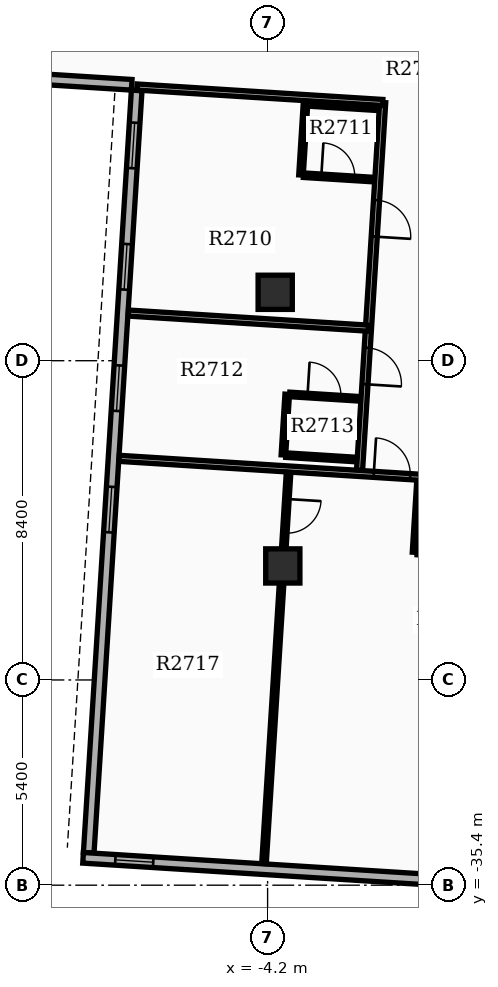
"""IFC4 building model, lengths in metres.
Left out: names, types, materials, properties, quantities, classifications, styles, units other than length and angle.
Written with IfcOpenShell. Run it as: python <this file> out.ifc"""

import sys

from ifc_helpers import new_model, si_unit, direction, frame, frame_2d, origin, origin_2d, place, context, subcontext, project, spatial, rectangle, extrude, element, fill, save


model = new_model("IFC4")
c1 = context("Model", 3, precision=1e-05, world=origin(), true_north=direction((0.0, 1.0)))
c2 = subcontext(c1, "Body", "Model", "MODEL_VIEW")
j1 = project(units=[si_unit("LENGTHUNIT", "METRE"), si_unit("PLANEANGLEUNIT", "RADIAN")], contexts=[c1])
p1 = place(None, origin())
s1 = spatial("IfcSite", under=j1, at=p1, CompositionType="ELEMENT")
p2 = place(p1, origin())
s2 = spatial("IfcBuilding", under=s1, at=p2, CompositionType="ELEMENT")
p3 = place(p2, frame((0.0, 0.0, 168.3)))
s3 = spatial("IfcBuildingStorey", under=s2, at=p3, CompositionType="ELEMENT", Elevation=168.3)
for number, where, z_axis, x_axis in (
    (1, (-4.0, -19.8, 0.0), (0.0, 0.0, 1.0), (1.0, 0.0, 0.0)),
    (2, (-3.8, -27.0, 0.0), (0.0, 0.0, 1.0), (1.0, 0.0, 0.0)),
):
    element("IfcColumn", number, at=place(p3, frame(where, z_axis=z_axis, x_axis=x_axis)), inside=s3, PredefinedType="COLUMN", context=c2, shape_type="SweptSolid", body=[
        extrude(rectangle(XDim=0.9, YDim=0.9, at=origin_2d()), origin(), (0.0, 0.0, 1.0), 3.9),
    ])
p4 = place(p3, frame((-7.645, -14.489, 0.0), z_axis=(0.0, 0.0, 1.0), x_axis=(-0.06279645424, -0.99802635503, 0.0)))
e3 = element("IfcWall", 3, at=p4, inside=s3, PredefinedType="STANDARD", context=c2, shape_type="SweptSolid", body=[
    extrude(rectangle(XDim=20.1, YDim=0.28, at=frame_2d((10.05, 0.0))), origin(), (0.0, 0.0, 1.0), 2.97),
])
p5 = place(p4, frame((0.85, 0.0, 0.8)))
e4 = element("IfcOpeningElement", 4, at=p5, cuts=e3, PredefinedType="OPENING", context=c2, shape_type="SweptSolid", body=[
    extrude(rectangle(XDim=1.2, YDim=1.6, at=frame_2d((0.6, 0.8))), frame((0.0, 0.15, 0.0), z_axis=(0.0, -1.0, 0.0), x_axis=(1.0, 0.0, 0.0)), (0.0, 0.0, 1.0), 0.3),
])
p6 = place(p4, frame((4.05, 0.0, 0.8)))
e5 = element("IfcOpeningElement", 5, at=p6, cuts=e3, PredefinedType="OPENING", context=c2, shape_type="SweptSolid", body=[
    extrude(rectangle(XDim=1.2, YDim=1.6, at=frame_2d((0.6, 0.8))), frame((0.0, 0.15, 0.0), z_axis=(0.0, -1.0, 0.0), x_axis=(1.0, 0.0, 0.0)), (0.0, 0.0, 1.0), 0.3),
])
p7 = place(p4, frame((7.25, 0.0, 0.8)))
e6 = element("IfcOpeningElement", 6, at=p7, cuts=e3, PredefinedType="OPENING", context=c2, shape_type="SweptSolid", body=[
    extrude(rectangle(XDim=1.2, YDim=1.6, at=frame_2d((0.6, 0.8))), frame((0.0, 0.15, 0.0), z_axis=(0.0, -1.0, 0.0), x_axis=(1.0, 0.0, 0.0)), (0.0, 0.0, 1.0), 0.3),
])
p8 = place(p4, frame((10.45, 0.0, 0.8)))
e7 = element("IfcOpeningElement", 7, at=p8, cuts=e3, PredefinedType="OPENING", context=c2, shape_type="SweptSolid", body=[
    extrude(rectangle(XDim=1.2, YDim=1.6, at=frame_2d((0.6, 0.8))), frame((0.0, 0.15, 0.0), z_axis=(0.0, -1.0, 0.0), x_axis=(1.0, 0.0, 0.0)), (0.0, 0.0, 1.0), 0.3),
])
p9 = place(p3, frame((-9.055, -34.68, 0.0), z_axis=(0.0, 0.0, 1.0), x_axis=(0.998026318072, -0.062797041623, 0.0)))
e8 = element("IfcWall", 8, at=p9, inside=s3, PredefinedType="STANDARD", context=c2, shape_type="SweptSolid", body=[
    extrude(rectangle(XDim=13.72, YDim=0.28, at=frame_2d((6.86, 0.0))), origin(), (0.0, 0.0, 1.0), 2.97),
])
p10 = place(p9, frame((0.85, 0.0, 0.85)))
e9 = element("IfcOpeningElement", 9, at=p10, cuts=e8, PredefinedType="OPENING", context=c2, shape_type="SweptSolid", body=[
    extrude(rectangle(XDim=1.0, YDim=1.5, at=frame_2d((0.5, 0.75))), frame((0.0, 0.15, 0.0), z_axis=(0.0, -1.0, 0.0), x_axis=(1.0, 0.0, 0.0)), (0.0, 0.0, 1.0), 0.3),
])
p11 = place(p3, frame((-14.063, -13.945, 0.0), z_axis=(0.0, 0.0, 1.0), x_axis=(0.998027314704, -0.062781200242, 0.0)))
e10 = element("IfcWall", 10, at=p11, inside=s3, PredefinedType="STANDARD", context=c2, shape_type="SweptSolid", body=[
    extrude(rectangle(XDim=6.3, YDim=0.28, at=frame_2d((3.15, 0.0))), origin(), (0.0, 0.0, 1.0), 2.97),
])
p12 = place(p3, frame((-1.172, -14.806, 0.0), z_axis=(0.0, 0.0, 1.0), x_axis=(-0.062771584278, -0.998027919553, 0.0)))
e11 = element("IfcWall", 11, at=p12, inside=s3, PredefinedType="PARTITIONING", context=c2, shape_type="SweptSolid", body=[
    extrude(rectangle(XDim=9.7, YDim=0.16, at=frame_2d((4.85, 0.0))), origin(), (0.0, 0.0, 1.0), 2.96),
])
p13 = place(p12, frame((2.575, 0.0, 0.0)))
e12 = element("IfcOpeningElement", 12, at=p13, cuts=e11, PredefinedType="OPENING", context=c2, shape_type="SweptSolid", body=[
    extrude(rectangle(XDim=0.96, YDim=2.15, at=frame_2d((0.48, 1.075))), frame((0.0, 0.09, 0.0), z_axis=(0.0, -1.0, 0.0), x_axis=(1.0, 0.0, 0.0)), (0.0, 0.0, 1.0), 0.18),
])
p14 = place(p12, frame((6.467, 0.0, 0.0)))
e13 = element("IfcOpeningElement", 13, at=p14, cuts=e11, PredefinedType="OPENING", context=c2, shape_type="SweptSolid", body=[
    extrude(rectangle(XDim=0.96, YDim=2.15, at=frame_2d((0.48, 1.075))), frame((0.0, 0.09, 0.0), z_axis=(0.0, -1.0, 0.0), x_axis=(1.0, 0.0, 0.0)), (0.0, 0.0, 1.0), 0.18),
])
p15 = place(p3, frame((-1.172, -14.806, 0.0), z_axis=(0.0, 0.0, 1.0), x_axis=(-0.998025657815, 0.06280753413, 0.0)))
e14 = element("IfcWall", 14, at=p15, inside=s3, PredefinedType="PARTITIONING", context=c2, shape_type="SweptSolid", body=[
    extrude(rectangle(XDim=6.48, YDim=0.16, at=frame_2d((3.24, 0.0))), origin(), (0.0, 0.0, 1.0), 2.96),
])
p16 = place(p3, frame((-1.546, -20.744, 0.0), z_axis=(0.0, 0.0, 1.0), x_axis=(-0.998025479614, 0.06281036572, 0.0)))
e15 = element("IfcWall", 15, at=p16, inside=s3, PredefinedType="PARTITIONING", context=c2, shape_type="SweptSolid", body=[
    extrude(rectangle(XDim=6.332, YDim=0.16, at=frame_2d((3.166, 0.0))), origin(), (0.0, 0.0, 1.0), 2.96),
])
p17 = place(p3, frame((-3.256, -16.719, 0.0), z_axis=(0.0, 0.0, 1.0), x_axis=(0.998027443946, -0.062779145668, 0.0)))
e16 = element("IfcWall", 16, at=p17, inside=s3, PredefinedType="PARTITIONING", context=c2, shape_type="SweptSolid", body=[
    extrude(rectangle(XDim=1.82, YDim=0.12, at=frame_2d((0.91, 0.0))), origin(), (0.0, 0.0, 1.0), 2.96),
])
p18 = place(p17, frame((0.47, 0.0, 0.0)))
e17 = element("IfcOpeningElement", 17, at=p18, cuts=e16, PredefinedType="OPENING", context=c2, shape_type="SweptSolid", body=[
    extrude(rectangle(XDim=0.88, YDim=2.1, at=frame_2d((0.44, 1.05))), frame((0.0, 0.07, 0.0), z_axis=(0.0, -1.0, 0.0), x_axis=(1.0, 0.0, 0.0)), (0.0, 0.0, 1.0), 0.14),
])
p19 = place(p3, frame((-3.138, -14.842, 0.0), z_axis=(0.0, 0.0, 1.0), x_axis=(0.998027443946, -0.062779145668, 0.0)))
e18 = element("IfcWall", 18, at=p19, inside=s3, PredefinedType="PARTITIONING", context=c2, shape_type="SweptSolid", body=[
    extrude(rectangle(XDim=1.82, YDim=0.12, at=frame_2d((0.91, 0.0))), origin(), (0.0, 0.0, 1.0), 2.96),
])
p20 = place(p3, frame((-3.203, -14.838, 0.0), z_axis=(0.0, 0.0, 1.0), x_axis=(-0.062847152131, -0.998023163794, 0.0)))
e19 = element("IfcWall", 19, at=p20, inside=s3, PredefinedType="PARTITIONING", context=c2, shape_type="SweptSolid", body=[
    extrude(rectangle(XDim=1.88, YDim=0.12, at=frame_2d((0.94, 0.0))), origin(), (0.0, 0.0, 1.0), 2.96),
])
p21 = place(p3, frame((-3.619, -22.487, 0.0), z_axis=(0.0, 0.0, 1.0), x_axis=(0.998027443946, -0.062779145668, 0.0)))
e20 = element("IfcWall", 20, at=p21, inside=s3, PredefinedType="PARTITIONING", context=c2, shape_type="SweptSolid", body=[
    extrude(rectangle(XDim=1.82, YDim=0.12, at=frame_2d((0.91, 0.0))), origin(), (0.0, 0.0, 1.0), 2.96),
])
p22 = place(p21, frame((0.47, 0.0, 0.0)))
e21 = element("IfcOpeningElement", 21, at=p22, cuts=e20, PredefinedType="OPENING", context=c2, shape_type="SweptSolid", body=[
    extrude(rectangle(XDim=0.88, YDim=2.1, at=frame_2d((0.44, 1.05))), frame((0.0, 0.07, 0.0), z_axis=(0.0, -1.0, 0.0), x_axis=(1.0, 0.0, 0.0)), (0.0, 0.0, 1.0), 0.14),
])
p23 = place(p3, frame((-3.719, -24.084, 0.0), z_axis=(0.0, 0.0, 1.0), x_axis=(0.998026915151, -0.062787551592, 0.0)))
e22 = element("IfcWall", 22, at=p23, inside=s3, PredefinedType="PARTITIONING", context=c2, shape_type="SweptSolid", body=[
    extrude(rectangle(XDim=1.82, YDim=0.12, at=frame_2d((0.91, 0.0))), origin(), (0.0, 0.0, 1.0), 2.96),
])
p24 = place(p3, frame((-3.684, -22.483, 0.0), z_axis=(0.0, 0.0, 1.0), x_axis=(-0.06271075472, -0.998031743605, 0.0)))
e23 = element("IfcWall", 23, at=p24, inside=s3, PredefinedType="PARTITIONING", context=c2, shape_type="SweptSolid", body=[
    extrude(rectangle(XDim=1.6, YDim=0.12, at=frame_2d((0.8, 0.0))), origin(), (0.0, 0.0, 1.0), 2.96),
])
p25 = place(p3, frame((-8.105, -24.169, 0.0), z_axis=(0.0, 0.0, 1.0), x_axis=(0.998026109115, -0.062800362452, 0.0)))
e24 = element("IfcWall", 24, at=p25, inside=s3, PredefinedType="PARTITIONING", context=c2, shape_type="SweptSolid", body=[
    extrude(rectangle(XDim=13.144, YDim=0.16, at=frame_2d((6.572, 0.0))), origin(), (0.0, 0.0, 1.0), 2.96),
])
p26 = place(p25, frame((6.712, 0.0, 0.0)))
e25 = element("IfcOpeningElement", 25, at=p26, cuts=e24, PredefinedType="OPENING", context=c2, shape_type="SweptSolid", body=[
    extrude(rectangle(XDim=0.96, YDim=2.15, at=frame_2d((0.48, 1.075))), frame((0.0, 0.09, 0.0), z_axis=(0.0, -1.0, 0.0), x_axis=(1.0, 0.0, 0.0)), (0.0, 0.0, 1.0), 0.18),
])
p27 = place(p3, frame((-3.648, -24.539, 0.0), z_axis=(0.0, 0.0, 1.0), x_axis=(-0.062786562543, -0.998026977373, 0.0)))
e26 = element("IfcWall", 26, at=p27, inside=s3, PredefinedType="PARTITIONING", context=c2, shape_type="SweptSolid", body=[
    extrude(rectangle(XDim=10.312, YDim=0.12, at=frame_2d((5.156, 0.0))), origin(), (0.0, 0.0, 1.0), 2.96),
])
p28 = place(p27, frame((0.7, 0.0, 0.0)))
e27 = element("IfcOpeningElement", 27, at=p28, cuts=e26, PredefinedType="OPENING", context=c2, shape_type="SweptSolid", body=[
    extrude(rectangle(XDim=0.9, YDim=2.1, at=frame_2d((0.45, 1.05))), frame((0.0, 0.07, 0.0), z_axis=(0.0, -1.0, 0.0), x_axis=(1.0, 0.0, 0.0)), (0.0, 0.0, 1.0), 0.14),
])
p29 = place(p3, frame((-0.219, -24.825, 0.0), z_axis=(0.0, 0.0, 1.0), x_axis=(-0.062779145668, -0.998027443946, 0.0)))
e28 = element("IfcWall", 28, at=p29, inside=s3, PredefinedType="PARTITIONING", context=c2, shape_type="SweptSolid", body=[
    extrude(rectangle(XDim=1.82, YDim=0.12, at=frame_2d((0.91, 0.0))), origin(), (0.0, 0.0, 1.0), 2.96),
])
p30 = place(p29, frame((0.45, 0.0, 0.0)))
e29 = element("IfcOpeningElement", 29, at=p30, cuts=e28, PredefinedType="OPENING", context=c2, shape_type="SweptSolid", body=[
    extrude(rectangle(XDim=0.88, YDim=2.1, at=frame_2d((0.44, 1.05))), frame((0.0, 0.07, 0.0), z_axis=(0.0, -1.0, 0.0), x_axis=(1.0, 0.0, 0.0)), (0.0, 0.0, 1.0), 0.14),
])
p31 = place(p3, frame((-0.264, -26.646, 0.0), z_axis=(0.0, 0.0, 1.0), x_axis=(0.998024591026, -0.062824483344, 0.0)))
e30 = element("IfcWall", 30, at=p31, inside=s3, PredefinedType="PARTITIONING", context=c2, shape_type="SweptSolid", body=[
    extrude(rectangle(XDim=2.18, YDim=0.12, at=frame_2d((1.09, 0.0))), origin(), (0.0, 0.0, 1.0), 2.96),
])
p32 = place(p5, origin())
e31 = element("IfcWindow", 31, at=p32, inside=s3, PartitioningType="SINGLE_PANEL", PredefinedType="WINDOW", context=c2, shape_type="SweptSolid", body=[
    extrude(rectangle(XDim=1.2, YDim=1.6, at=frame_2d((0.6, 0.8))), frame((0.0, 0.03, 0.0), z_axis=(0.0, -1.0, 0.0), x_axis=(1.0, 0.0, 0.0)), (0.0, 0.0, 1.0), 0.06),
])
fill(e4, e31)
p33 = place(p6, origin())
e32 = element("IfcWindow", 32, at=p33, inside=s3, PartitioningType="SINGLE_PANEL", PredefinedType="WINDOW", context=c2, shape_type="SweptSolid", body=[
    extrude(rectangle(XDim=1.2, YDim=1.6, at=frame_2d((0.6, 0.8))), frame((0.0, 0.03, 0.0), z_axis=(0.0, -1.0, 0.0), x_axis=(1.0, 0.0, 0.0)), (0.0, 0.0, 1.0), 0.06),
])
fill(e5, e32)
p34 = place(p7, origin())
e33 = element("IfcWindow", 33, at=p34, inside=s3, PartitioningType="SINGLE_PANEL", PredefinedType="WINDOW", context=c2, shape_type="SweptSolid", body=[
    extrude(rectangle(XDim=1.2, YDim=1.6, at=frame_2d((0.6, 0.8))), frame((0.0, 0.03, 0.0), z_axis=(0.0, -1.0, 0.0), x_axis=(1.0, 0.0, 0.0)), (0.0, 0.0, 1.0), 0.06),
])
fill(e6, e33)
p35 = place(p8, origin())
e34 = element("IfcWindow", 34, at=p35, inside=s3, PartitioningType="SINGLE_PANEL", PredefinedType="WINDOW", context=c2, shape_type="SweptSolid", body=[
    extrude(rectangle(XDim=1.2, YDim=1.6, at=frame_2d((0.6, 0.8))), frame((0.0, 0.03, 0.0), z_axis=(0.0, -1.0, 0.0), x_axis=(1.0, 0.0, 0.0)), (0.0, 0.0, 1.0), 0.06),
])
fill(e7, e34)
p36 = place(p10, origin())
e35 = element("IfcWindow", 35, at=p36, inside=s3, PartitioningType="SINGLE_PANEL", PredefinedType="WINDOW", context=c2, shape_type="SweptSolid", body=[
    extrude(rectangle(XDim=1.0, YDim=1.5, at=frame_2d((0.5, 0.75))), frame((0.0, 0.03, 0.0), z_axis=(0.0, -1.0, 0.0), x_axis=(1.0, 0.0, 0.0)), (0.0, 0.0, 1.0), 0.06),
])
fill(e9, e35)
p37 = place(p13, origin())
e36 = element("IfcDoor", 36, at=p37, inside=s3, OperationType="SINGLE_SWING_RIGHT", PredefinedType="DOOR", context=c2, shape_type="SweptSolid", body=[
    extrude(rectangle(XDim=0.96, YDim=2.15, at=frame_2d((0.48, 1.075))), frame((0.0, 0.025, 0.0), z_axis=(0.0, -1.0, 0.0), x_axis=(1.0, 0.0, 0.0)), (0.0, 0.0, 1.0), 0.05),
])
fill(e12, e36)
p38 = place(p18, origin())
e37 = element("IfcDoor", 37, at=p38, inside=s3, OperationType="SINGLE_SWING_LEFT", PredefinedType="DOOR", context=c2, shape_type="SweptSolid", body=[
    extrude(rectangle(XDim=0.88, YDim=2.1, at=frame_2d((0.44, 1.05))), frame((0.0, 0.025, 0.0), z_axis=(0.0, -1.0, 0.0), x_axis=(1.0, 0.0, 0.0)), (0.0, 0.0, 1.0), 0.05),
])
fill(e17, e37)
p39 = place(p14, origin())
e38 = element("IfcDoor", 38, at=p39, inside=s3, OperationType="SINGLE_SWING_RIGHT", PredefinedType="DOOR", context=c2, shape_type="SweptSolid", body=[
    extrude(rectangle(XDim=0.96, YDim=2.15, at=frame_2d((0.48, 1.075))), frame((0.0, 0.025, 0.0), z_axis=(0.0, -1.0, 0.0), x_axis=(1.0, 0.0, 0.0)), (0.0, 0.0, 1.0), 0.05),
])
fill(e13, e38)
p40 = place(p22, origin())
e39 = element("IfcDoor", 39, at=p40, inside=s3, OperationType="SINGLE_SWING_LEFT", PredefinedType="DOOR", context=c2, shape_type="SweptSolid", body=[
    extrude(rectangle(XDim=0.88, YDim=2.1, at=frame_2d((0.44, 1.05))), frame((0.0, 0.025, 0.0), z_axis=(0.0, -1.0, 0.0), x_axis=(1.0, 0.0, 0.0)), (0.0, 0.0, 1.0), 0.05),
])
fill(e21, e39)
p41 = place(p26, origin())
e40 = element("IfcDoor", 40, at=p41, inside=s3, OperationType="SINGLE_SWING_LEFT", PredefinedType="DOOR", context=c2, shape_type="SweptSolid", body=[
    extrude(rectangle(XDim=0.96, YDim=2.15, at=frame_2d((0.48, 1.075))), frame((0.0, 0.025, 0.0), z_axis=(0.0, -1.0, 0.0), x_axis=(1.0, 0.0, 0.0)), (0.0, 0.0, 1.0), 0.05),
])
fill(e25, e40)
p42 = place(p28, origin())
e41 = element("IfcDoor", 41, at=p42, inside=s3, OperationType="SINGLE_SWING_LEFT", PredefinedType="DOOR", context=c2, shape_type="SweptSolid", body=[
    extrude(rectangle(XDim=0.9, YDim=2.1, at=frame_2d((0.45, 1.05))), frame((0.0, 0.025, 0.0), z_axis=(0.0, -1.0, 0.0), x_axis=(1.0, 0.0, 0.0)), (0.0, 0.0, 1.0), 0.05),
])
fill(e27, e41)
p43 = place(p30, origin())
e42 = element("IfcDoor", 42, at=p43, inside=s3, OperationType="SINGLE_SWING_RIGHT", PredefinedType="DOOR", context=c2, shape_type="SweptSolid", body=[
    extrude(rectangle(XDim=0.88, YDim=2.1, at=frame_2d((0.44, 1.05))), frame((0.0, 0.025, 0.0), z_axis=(0.0, -1.0, 0.0), x_axis=(1.0, 0.0, 0.0)), (0.0, 0.0, 1.0), 0.05),
])
fill(e29, e42)
save(model, sys.argv[1])
